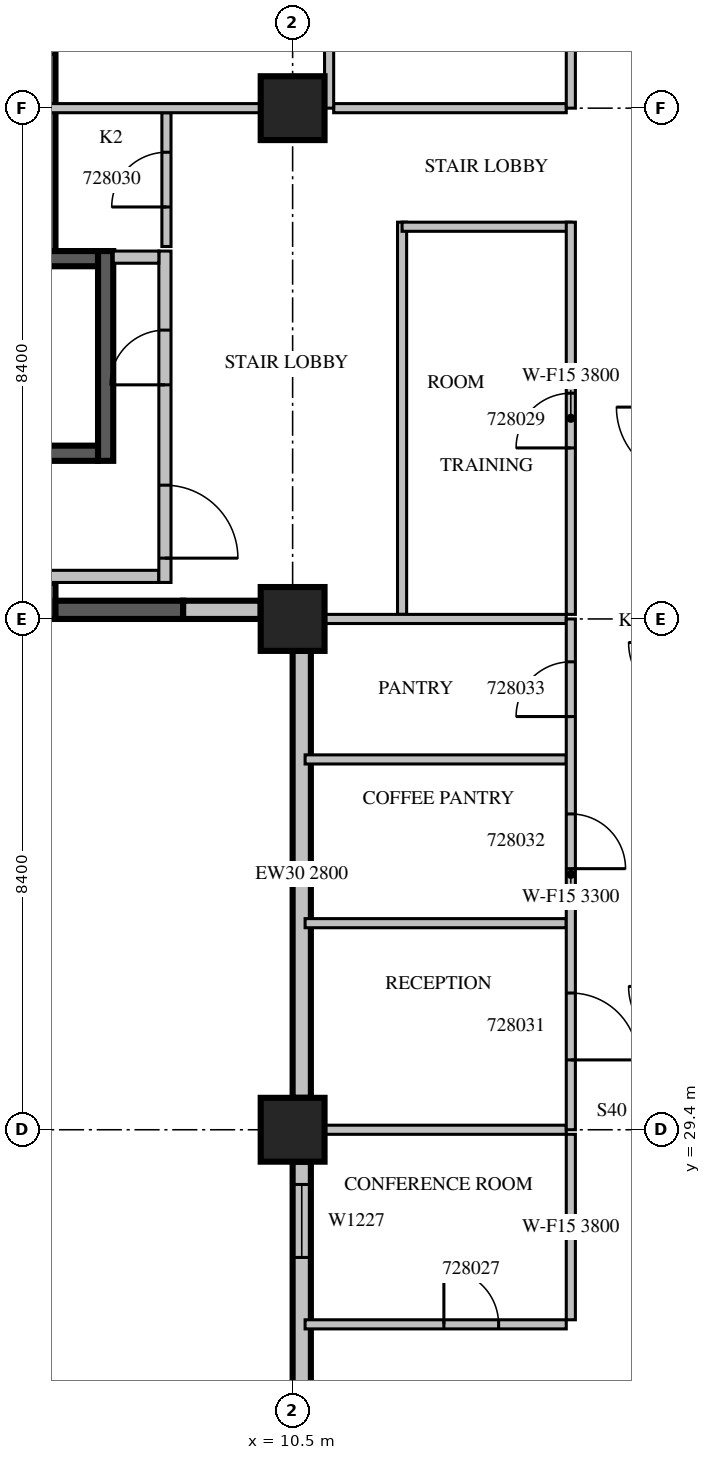
"""IFC4 building model, lengths in metres.
Left out: names, types, materials, properties, quantities, classifications, styles, units other than length and angle.
Written with IfcOpenShell. Run it as: python <this file> out.ifc"""

import sys

from ifc_helpers import new_model, si_unit, direction, frame, frame_2d, origin, origin_2d, place, context, subcontext, project, spatial, rectangle, extrude, source, transform, mapped, element, fill, save


model = new_model("IFC4")
c1 = context("Model", 3, precision=1e-05, world=origin(), true_north=direction((0.0, 1.0)))
c2 = subcontext(c1, "Body", "Model", "MODEL_VIEW")
j1 = project(units=[si_unit("LENGTHUNIT", "METRE"), si_unit("PLANEANGLEUNIT", "RADIAN")], contexts=[c1])
p1 = place(None, origin())
s1 = spatial("IfcSite", under=j1, at=p1, CompositionType="ELEMENT")
p2 = place(p1, origin())
s2 = spatial("IfcBuilding", under=s1, at=p2, CompositionType="ELEMENT")
p3 = place(p2, frame((0.0, 0.0, 128.7)))
s3 = spatial("IfcBuildingStorey", under=s2, at=p3, CompositionType="ELEMENT", Elevation=128.7)
m1 = source(origin(), c2, "Body", "SweptSolid", [
    extrude(rectangle(XDim=1.05, YDim=1.05, at=origin_2d()), origin(), (0.0, 0.0, 1.0), 4.2),
])
for number, where, z_axis, x_axis in (
    (1, (10.5, 29.4, 0.0), (0.0, 0.0, 1.0), (1.0, 0.0, 0.0)),
    (2, (10.5, 37.8, 0.0), (0.0, 0.0, 1.0), (1.0, 0.0, 0.0)),
    (3, (10.5, 46.2, 0.0), (0.0, 0.0, 1.0), (1.0, 0.0, 0.0)),
):
    element("IfcColumn", number, at=place(p3, frame(where, z_axis=z_axis, x_axis=x_axis)), inside=s3, PredefinedType="COLUMN", context=c2, shape_type="MappedRepresentation", body=[
        mapped(m1, transform((0.0, 0.0, 0.0), scale=1.0)),
    ])
m2 = source(origin(), c2, "Body", "SweptSolid", [
    extrude(rectangle(XDim=9.91, YDim=0.3, at=frame_2d((4.955, 0.0))), origin(), (0.0, 0.0, 1.0), 3.8),
])
p4 = place(p3, frame((6.45, 53.76, 0.0), z_axis=(0.0, 0.0, 1.0), x_axis=(0.0, -1.0, 0.0)))
e4 = element("IfcWall", 4, at=p4, inside=s3, PredefinedType="STANDARD", context=c2, shape_type="MappedRepresentation", body=[
    mapped(m2, transform((0.0, 0.0, 0.0), scale=1.0)),
])
m3 = source(origin(), c2, "Body", "SweptSolid", [
    extrude(rectangle(XDim=2.4, YDim=2.7, at=frame_2d((1.2, 1.35))), frame((0.0, 0.16, 0.0), z_axis=(0.0, -1.0, 0.0), x_axis=(1.0, 0.0, 0.0)), (0.0, 0.0, 1.0), 0.32),
])
p5 = place(p4, frame((4.272, 0.0, 0.6)))
e5 = element("IfcOpeningElement", 5, at=p5, cuts=e4, PredefinedType="OPENING", context=c2, shape_type="MappedRepresentation", body=[
    mapped(m3, transform((0.0, 0.0, 0.0), scale=1.0)),
])
p6 = place(p4, frame((0.936, 0.0, 0.6)))
e6 = element("IfcOpeningElement", 6, at=p6, cuts=e4, PredefinedType="OPENING", context=c2, shape_type="MappedRepresentation", body=[
    mapped(m3, transform((0.0, 0.0, 0.0), scale=1.0)),
])
m4 = source(origin(), c2, "Body", "SweptSolid", [
    extrude(rectangle(XDim=0.6, YDim=0.3, at=frame_2d((0.3, 0.0))), origin(), (0.0, 0.0, 1.0), 3.8),
])
p7 = place(p3, frame((6.45, 38.4, 0.0), z_axis=(0.0, 0.0, 1.0), x_axis=(0.0, -1.0, 0.0)))
e7 = element("IfcWall", 7, at=p7, inside=s3, PredefinedType="STANDARD", context=c2, shape_type="MappedRepresentation", body=[
    mapped(m4, transform((0.0, 0.0, 0.0), scale=1.0)),
])
m5 = source(origin(), c2, "Body", "SweptSolid", [
    extrude(rectangle(XDim=2.1, YDim=0.3, at=frame_2d((1.05, 0.0))), origin(), (0.0, 0.0, 1.0), 3.8),
])
p8 = place(p3, frame((6.6, 37.95, 0.0), z_axis=(0.0, 0.0, 1.0), x_axis=(1.0, 0.0, 0.0)))
e8 = element("IfcWall", 8, at=p8, inside=s3, PredefinedType="SOLIDWALL", context=c2, shape_type="MappedRepresentation", body=[
    mapped(m5, transform((0.0, 0.0, 0.0), scale=1.0)),
])
m6 = source(origin(), c2, "Body", "SweptSolid", [
    extrude(rectangle(XDim=1.275, YDim=0.3, at=frame_2d((0.637, 0.0))), origin(), (0.0, 0.0, 1.0), 3.8),
])
p9 = place(p3, frame((8.7, 37.95, 0.0), z_axis=(0.0, 0.0, 1.0), x_axis=(1.0, 0.0, 0.0)))
e9 = element("IfcWall", 9, at=p9, inside=s3, PredefinedType="STANDARD", context=c2, shape_type="MappedRepresentation", body=[
    mapped(m6, transform((0.0, 0.0, 0.0), scale=1.0)),
])
p10 = place(p3, frame((10.65, 37.275, 0.0), z_axis=(0.0, 0.0, 1.0), x_axis=(0.0, -1.0, 0.0)))
e10 = element("IfcWall", 10, at=p10, inside=s3, PredefinedType="STANDARD", context=c2, shape_type="SweptSolid", body=[
    extrude(rectangle(XDim=7.35, YDim=0.3, at=frame_2d((3.675, 0.0))), origin(), (0.0, 0.0, 1.0), 2.8),
])
m7 = source(origin(), c2, "Body", "SweptSolid", [
    extrude(rectangle(XDim=6.875, YDim=0.3, at=frame_2d((3.438, 0.0))), origin(), (0.0, 0.0, 1.0), 3.8),
])
p11 = place(p3, frame((10.65, 28.875, 0.0), z_axis=(0.0, 0.0, 1.0), x_axis=(0.0, -1.0, 0.0)))
e11 = element("IfcWall", 11, at=p11, inside=s3, PredefinedType="STANDARD", context=c2, shape_type="MappedRepresentation", body=[
    mapped(m7, transform((0.0, 0.0, 0.0), scale=1.0)),
])
m8 = source(origin(), c2, "Body", "SweptSolid", [
    extrude(rectangle(XDim=1.2, YDim=2.7, at=frame_2d((0.6, 1.35))), frame((0.0, 0.16, 0.0), z_axis=(0.0, -1.0, 0.0), x_axis=(1.0, 0.0, 0.0)), (0.0, 0.0, 1.0), 0.32),
])
p12 = place(p11, frame((0.375, 0.0, 0.6)))
e12 = element("IfcOpeningElement", 12, at=p12, cuts=e11, PredefinedType="OPENING", context=c2, shape_type="MappedRepresentation", body=[
    mapped(m8, transform((0.0, 0.0, 0.0), scale=1.0)),
])
m9 = source(origin(), c2, "Body", "SweptSolid", [
    extrude(rectangle(XDim=3.0, YDim=2.7, at=frame_2d((1.5, 1.35))), frame((0.0, 0.16, 0.0), z_axis=(0.0, -1.0, 0.0), x_axis=(1.0, 0.0, 0.0)), (0.0, 0.0, 1.0), 0.32),
])
p13 = place(p11, frame((3.675, 0.0, 0.6)))
e13 = element("IfcOpeningElement", 13, at=p13, cuts=e11, PredefinedType="OPENING", context=c2, shape_type="MappedRepresentation", body=[
    mapped(m9, transform((0.0, 0.0, 0.0), scale=1.0)),
])
m10 = source(origin(), c2, "Body", "SweptSolid", [
    extrude(rectangle(XDim=7.0, YDim=0.25, at=frame_2d((3.5, 0.0))), origin(), (0.0, 0.0, 1.0), 3.8),
])
p14 = place(p3, frame((0.3, 40.525, 0.0), z_axis=(0.0, 0.0, 1.0), x_axis=(1.0, 0.0, 0.0)))
e14 = element("IfcWall", 14, at=p14, inside=s3, PredefinedType="SOLIDWALL", context=c2, shape_type="MappedRepresentation", body=[
    mapped(m10, transform((0.0, 0.0, 0.0), scale=1.0)),
])
m11 = source(origin(), c2, "Body", "SweptSolid", [
    extrude(rectangle(XDim=1.1, YDim=2.1, at=frame_2d((0.55, 1.05))), frame((0.0, 0.135, 0.0), z_axis=(0.0, -1.0, 0.0), x_axis=(1.0, 0.0, 0.0)), (0.0, 0.0, 1.0), 0.27),
])
p15 = place(p14, frame((0.55, 0.0, 0.0)))
e15 = element("IfcOpeningElement", 15, at=p15, cuts=e14, PredefinedType="OPENING", context=c2, shape_type="MappedRepresentation", body=[
    mapped(m11, transform((0.0, 0.0, 0.0), scale=1.0)),
])
m12 = source(origin(), c2, "Body", "SweptSolid", [
    extrude(rectangle(XDim=1.0, YDim=0.25, at=frame_2d((0.5, 0.0))), origin(), (0.0, 0.0, 1.0), 3.8),
])
p16 = place(p3, frame((6.3, 43.725, 0.0), z_axis=(0.0, 0.0, 1.0), x_axis=(1.0, 0.0, 0.0)))
e16 = element("IfcWall", 16, at=p16, inside=s3, PredefinedType="SOLIDWALL", context=c2, shape_type="MappedRepresentation", body=[
    mapped(m12, transform((0.0, 0.0, 0.0), scale=1.0)),
])
m13 = source(origin(), c2, "Body", "SweptSolid", [
    extrude(rectangle(XDim=3.45, YDim=0.25, at=frame_2d((1.725, 0.0))), origin(), (0.0, 0.0, 1.0), 3.8),
])
p17 = place(p3, frame((7.425, 40.4, 0.0), z_axis=(0.0, 0.0, 1.0), x_axis=(0.0, 1.0, 0.0)))
e17 = element("IfcWall", 17, at=p17, inside=s3, PredefinedType="SOLIDWALL", context=c2, shape_type="MappedRepresentation", body=[
    mapped(m13, transform((0.0, 0.0, 0.0), scale=1.0)),
])
m14 = source(origin(), c2, "Body", "SweptSolid", [
    extrude(rectangle(XDim=2.0, YDim=0.2, at=frame_2d((1.0, 0.0))), origin(), (0.0, 0.0, 1.0), 3.8),
])
p18 = place(p3, frame((6.3, 38.5, 0.0), z_axis=(0.0, 0.0, 1.0), x_axis=(1.0, 0.0, 0.0)))
e18 = element("IfcWall", 18, at=p18, inside=s3, PredefinedType="PARTITIONING", context=c2, shape_type="MappedRepresentation", body=[
    mapped(m14, transform((0.0, 0.0, 0.0), scale=1.0)),
])
m15 = source(origin(), c2, "Body", "SweptSolid", [
    extrude(rectangle(XDim=5.45, YDim=0.2, at=frame_2d((2.725, 0.0))), origin(), (0.0, 0.0, 1.0), 3.8),
])
p19 = place(p3, frame((8.4, 38.4, 0.0), z_axis=(0.0, 0.0, 1.0), x_axis=(0.0, 1.0, 0.0)))
e19 = element("IfcWall", 19, at=p19, inside=s3, PredefinedType="PARTITIONING", context=c2, shape_type="MappedRepresentation", body=[
    mapped(m15, transform((0.0, 0.0, 0.0), scale=1.0)),
])
m16 = source(origin(), c2, "Body", "SweptSolid", [
    extrude(rectangle(XDim=1.2, YDim=2.1, at=frame_2d((0.6, 1.05))), frame((0.0, 0.11, 0.0), z_axis=(0.0, -1.0, 0.0), x_axis=(1.0, 0.0, 0.0)), (0.0, 0.0, 1.0), 0.22),
])
p20 = place(p19, frame((0.4, 0.0, 0.0)))
e20 = element("IfcOpeningElement", 20, at=p20, cuts=e19, PredefinedType="OPENING", context=c2, shape_type="MappedRepresentation", body=[
    mapped(m16, transform((0.0, 0.0, 0.0), scale=1.0)),
])
m17 = source(origin(), c2, "Body", "SweptSolid", [
    extrude(rectangle(XDim=0.9, YDim=2.1, at=frame_2d((0.45, 1.05))), frame((0.0, 0.11, 0.0), z_axis=(0.0, -1.0, 0.0), x_axis=(1.0, 0.0, 0.0)), (0.0, 0.0, 1.0), 0.22),
])
p21 = place(p19, frame((3.25, 0.0, 0.0)))
e21 = element("IfcOpeningElement", 21, at=p21, cuts=e19, PredefinedType="OPENING", context=c2, shape_type="MappedRepresentation", body=[
    mapped(m17, transform((0.0, 0.0, 0.0), scale=1.0)),
])
m18 = source(origin(), c2, "Body", "SweptSolid", [
    extrude(rectangle(XDim=0.75, YDim=0.2, at=frame_2d((0.375, 0.0))), origin(), (0.0, 0.0, 1.0), 3.8),
])
p22 = place(p3, frame((7.55, 43.75, 0.0), z_axis=(0.0, 0.0, 1.0), x_axis=(1.0, 0.0, 0.0)))
e22 = element("IfcWall", 22, at=p22, inside=s3, PredefinedType="PARTITIONING", context=c2, shape_type="MappedRepresentation", body=[
    mapped(m18, transform((0.0, 0.0, 0.0), scale=1.0)),
])
m19 = source(origin(), c2, "Body", "SweptSolid", [
    extrude(rectangle(XDim=4.295, YDim=0.15, at=frame_2d((2.147, 0.0))), origin(), (0.0, 0.0, 1.0), 3.8),
])
p23 = place(p3, frame((10.705, 26.2, 0.0), z_axis=(0.0, 0.0, 1.0), x_axis=(1.0, 0.0, 0.0)))
e23 = element("IfcWall", 23, at=p23, inside=s3, PredefinedType="PARTITIONING", context=c2, shape_type="MappedRepresentation", body=[
    mapped(m19, transform((0.0, 0.0, 0.0), scale=1.0)),
])
m20 = source(origin(), c2, "Body", "SweptSolid", [
    extrude(rectangle(XDim=0.9, YDim=2.1, at=frame_2d((0.45, 1.05))), frame((0.0, 0.085, 0.0), z_axis=(0.0, -1.0, 0.0), x_axis=(1.0, 0.0, 0.0)), (0.0, 0.0, 1.0), 0.17),
])
p24 = place(p23, frame((2.283, 0.0, 0.0)))
e24 = element("IfcOpeningElement", 24, at=p24, cuts=e23, PredefinedType="OPENING", context=c2, shape_type="MappedRepresentation", body=[
    mapped(m20, transform((0.0, 0.0, 0.0), scale=1.0)),
])
m21 = source(origin(), c2, "Body", "SweptSolid", [
    extrude(rectangle(XDim=3.05, YDim=0.15, at=frame_2d((1.525, 0.0))), origin(), (0.0, 0.0, 1.0), 3.8),
])
p25 = place(p3, frame((15.075, 26.275, 0.0), z_axis=(0.0, 0.0, 1.0), x_axis=(0.0, 1.0, 0.0)))
e25 = element("IfcWall", 25, at=p25, inside=s3, PredefinedType="PARTITIONING", context=c2, shape_type="MappedRepresentation", body=[
    mapped(m21, transform((0.0, 0.0, 0.0), scale=1.0)),
])
m22 = source(origin(), c2, "Body", "SweptSolid", [
    extrude(rectangle(XDim=3.976, YDim=0.15, at=frame_2d((1.988, 0.0))), origin(), (0.0, 0.0, 1.0), 3.8),
])
p26 = place(p3, frame((15.0, 29.4, 0.0), z_axis=(0.0, 0.0, 1.0), x_axis=(-1.0, 0.0, 0.0)))
e26 = element("IfcWall", 26, at=p26, inside=s3, PredefinedType="PARTITIONING", context=c2, shape_type="MappedRepresentation", body=[
    mapped(m22, transform((0.0, 0.0, 0.0), scale=1.0)),
])
m23 = source(origin(), c2, "Body", "SweptSolid", [
    extrude(rectangle(XDim=6.45, YDim=0.15, at=frame_2d((3.225, 0.0))), origin(), (0.0, 0.0, 1.0), 3.8),
])
p27 = place(p3, frame((12.3, 44.325, 0.0), z_axis=(0.0, 0.0, 1.0), x_axis=(0.0, -1.0, 0.0)))
e27 = element("IfcWall", 27, at=p27, inside=s3, PredefinedType="PARTITIONING", context=c2, shape_type="MappedRepresentation", body=[
    mapped(m23, transform((0.0, 0.0, 0.0), scale=1.0)),
])
m24 = source(origin(), c2, "Body", "SweptSolid", [
    extrude(rectangle(XDim=2.775, YDim=0.15, at=frame_2d((1.387, 0.0))), origin(), (0.0, 0.0, 1.0), 3.8),
])
p28 = place(p3, frame((15.075, 44.25, 0.0), z_axis=(0.0, 0.0, 1.0), x_axis=(-1.0, 0.0, 0.0)))
e28 = element("IfcWall", 28, at=p28, inside=s3, PredefinedType="PARTITIONING", context=c2, shape_type="MappedRepresentation", body=[
    mapped(m24, transform((0.0, 0.0, 0.0), scale=1.0)),
])
p29 = place(p3, frame((15.075, 37.875, 0.0), z_axis=(0.0, 0.0, 1.0), x_axis=(0.0, 1.0, 0.0)))
e29 = element("IfcWall", 29, at=p29, inside=s3, PredefinedType="PARTITIONING", context=c2, shape_type="MappedRepresentation", body=[
    mapped(m23, transform((0.0, 0.0, 0.0), scale=1.0)),
])
p30 = place(p29, frame((2.737, 0.0, 0.0)))
e30 = element("IfcOpeningElement", 30, at=p30, cuts=e29, PredefinedType="OPENING", context=c2, shape_type="MappedRepresentation", body=[
    mapped(m20, transform((0.0, 0.0, 0.0), scale=1.0)),
])
m25 = source(origin(), c2, "Body", "SweptSolid", [
    extrude(rectangle(XDim=2.2, YDim=0.15, at=frame_2d((1.1, 0.0))), origin(), (0.0, 0.0, 1.0), 3.8),
])
p31 = place(p3, frame((8.425, 43.925, 0.0), z_axis=(0.0, 0.0, 1.0), x_axis=(0.0, 1.0, 0.0)))
e31 = element("IfcWall", 31, at=p31, inside=s3, PredefinedType="PARTITIONING", context=c2, shape_type="MappedRepresentation", body=[
    mapped(m25, transform((0.0, 0.0, 0.0), scale=1.0)),
])
p32 = place(p31, frame((0.65, 0.0, 0.0)))
e32 = element("IfcOpeningElement", 32, at=p32, cuts=e31, PredefinedType="OPENING", context=c2, shape_type="MappedRepresentation", body=[
    mapped(m20, transform((0.0, 0.0, 0.0), scale=1.0)),
])
for number, where, z_axis, x_axis in (
    (33, (15.0, 32.797, 0.0), (0.0, 0.0, 1.0), (-1.0, 0.0, 0.0)),
    (34, (15.0, 35.49, 0.0), (0.0, 0.0, 1.0), (-1.0, 0.0, 0.0)),
):
    element("IfcWall", number, at=place(p3, frame(where, z_axis=z_axis, x_axis=x_axis)), inside=s3, PredefinedType="PARTITIONING", context=c2, shape_type="MappedRepresentation", body=[
        mapped(m19, transform((0.0, 0.0, 0.0), scale=1.0)),
    ])
p33 = place(p3, frame((15.0, 37.8, 0.0), z_axis=(0.0, 0.0, 1.0), x_axis=(-1.0, 0.0, 0.0)))
e35 = element("IfcWall", 35, at=p33, inside=s3, PredefinedType="PARTITIONING", context=c2, shape_type="MappedRepresentation", body=[
    mapped(m22, transform((0.0, 0.0, 0.0), scale=1.0)),
])
m26 = source(origin(), c2, "Body", "SweptSolid", [
    extrude(rectangle(XDim=3.471, YDim=0.15, at=frame_2d((1.736, 0.0))), origin(), (0.0, 0.0, 1.0), 3.8),
])
p34 = place(p3, frame((9.976, 46.2, 0.0), z_axis=(0.0, 0.0, 1.0), x_axis=(-1.0, 0.0, 0.0)))
e36 = element("IfcWall", 36, at=p34, inside=s3, PredefinedType="PARTITIONING", context=c2, shape_type="MappedRepresentation", body=[
    mapped(m26, transform((0.0, 0.0, 0.0), scale=1.0)),
])
m27 = source(origin(), c2, "Body", "SweptSolid", [
    extrude(rectangle(XDim=3.825, YDim=0.15, at=frame_2d((1.913, 0.0))), origin(), (0.0, 0.0, 1.0), 3.8),
])
p35 = place(p3, frame((15.0, 46.2, 0.0), z_axis=(0.0, 0.0, 1.0), x_axis=(-1.0, 0.0, 0.0)))
e37 = element("IfcWall", 37, at=p35, inside=s3, PredefinedType="PARTITIONING", context=c2, shape_type="MappedRepresentation", body=[
    mapped(m27, transform((0.0, 0.0, 0.0), scale=1.0)),
])
m28 = source(origin(), c2, "Body", "SweptSolid", [
    extrude(rectangle(XDim=7.26, YDim=0.15, at=frame_2d((3.63, 0.0))), origin(), (0.0, 0.0, 1.0), 3.8),
])
p36 = place(p3, frame((11.1, 46.2, 0.0), z_axis=(0.0, 0.0, 1.0), x_axis=(0.0, 1.0, 0.0)))
e38 = element("IfcWall", 38, at=p36, inside=s3, PredefinedType="PARTITIONING", context=c2, shape_type="MappedRepresentation", body=[
    mapped(m28, transform((0.0, 0.0, 0.0), scale=1.0)),
])
p37 = place(p36, frame((1.715, 0.0, 0.0)))
e39 = element("IfcOpeningElement", 39, at=p37, cuts=e38, PredefinedType="OPENING", context=c2, shape_type="MappedRepresentation", body=[
    mapped(m20, transform((0.0, 0.0, 0.0), scale=1.0)),
])
p38 = place(p36, frame((4.155, 0.0, 0.0)))
e40 = element("IfcOpeningElement", 40, at=p38, cuts=e38, PredefinedType="OPENING", context=c2, shape_type="MappedRepresentation", body=[
    mapped(m20, transform((0.0, 0.0, 0.0), scale=1.0)),
])
m29 = source(origin(), c2, "Body", "SweptSolid", [
    extrude(rectangle(XDim=8.4, YDim=0.15, at=frame_2d((4.2, 0.0))), origin(), (0.0, 0.0, 1.0), 3.3),
])
p39 = place(p3, frame((15.075, 29.4, 0.0), z_axis=(0.0, 0.0, 1.0), x_axis=(0.0, 1.0, 0.0)))
e41 = element("IfcWall", 41, at=p39, inside=s3, PredefinedType="PARTITIONING", context=c2, shape_type="MappedRepresentation", body=[
    mapped(m29, transform((0.0, 0.0, 0.0), scale=1.0)),
])
m30 = source(origin(), c2, "Body", "SweptSolid", [
    extrude(rectangle(XDim=1.1, YDim=2.1, at=frame_2d((0.55, 1.05))), frame((0.0, 0.085, 0.0), z_axis=(0.0, -1.0, 0.0), x_axis=(1.0, 0.0, 0.0)), (0.0, 0.0, 1.0), 0.17),
])
p40 = place(p39, frame((1.149, 0.0, 0.0)))
e42 = element("IfcOpeningElement", 42, at=p40, cuts=e41, PredefinedType="OPENING", context=c2, shape_type="MappedRepresentation", body=[
    mapped(m30, transform((0.0, 0.0, 0.0), scale=1.0)),
])
p41 = place(p39, frame((4.293, 0.0, 0.0)))
e43 = element("IfcOpeningElement", 43, at=p41, cuts=e41, PredefinedType="OPENING", context=c2, shape_type="MappedRepresentation", body=[
    mapped(m20, transform((0.0, 0.0, 0.0), scale=1.0)),
])
p42 = place(p39, frame((6.795, 0.0, 0.0)))
e44 = element("IfcOpeningElement", 44, at=p42, cuts=e41, PredefinedType="OPENING", context=c2, shape_type="MappedRepresentation", body=[
    mapped(m20, transform((0.0, 0.0, 0.0), scale=1.0)),
])
p43 = place(p3, frame((15.075, 46.2, 0.0), z_axis=(0.0, 0.0, 1.0), x_axis=(0.0, 1.0, 0.0)))
e45 = element("IfcWall", 45, at=p43, inside=s3, PredefinedType="PARTITIONING", context=c2, shape_type="MappedRepresentation", body=[
    mapped(m28, transform((0.0, 0.0, 0.0), scale=1.0)),
])
m31 = source(origin(), c2, "Body", "SweptSolid", [
    extrude(rectangle(XDim=1.2, YDim=2.1, at=frame_2d((0.6, 1.05))), frame((0.0, 0.085, 0.0), z_axis=(0.0, -1.0, 0.0), x_axis=(1.0, 0.0, 0.0)), (0.0, 0.0, 1.0), 0.17),
])
p44 = place(p43, frame((3.067, 0.0, 0.0)))
e46 = element("IfcOpeningElement", 46, at=p44, cuts=e45, PredefinedType="OPENING", context=c2, shape_type="MappedRepresentation", body=[
    mapped(m31, transform((0.0, 0.0, 0.0), scale=1.0)),
])
m32 = source(origin(), c2, "Body", "SweptSolid", [
    extrude(rectangle(XDim=1.2, YDim=2.7, at=frame_2d((0.6, 1.35))), frame((0.0, 0.03, 0.0), z_axis=(0.0, -1.0, 0.0), x_axis=(1.0, 0.0, 0.0)), (0.0, 0.0, 1.0), 0.06),
])
p45 = place(p12, origin())
e47 = element("IfcWindow", 47, at=p45, inside=s3, PartitioningType="SINGLE_PANEL", PredefinedType="WINDOW", context=c2, shape_type="MappedRepresentation", body=[
    mapped(m32, transform((0.0, 0.0, 0.0), scale=1.0)),
])
fill(e12, e47)
m33 = source(origin(), c2, "Body", "SweptSolid", [
    extrude(rectangle(XDim=1.2, YDim=2.1, at=frame_2d((0.6, 1.05))), frame((0.0, 0.025, 0.0), z_axis=(0.0, -1.0, 0.0), x_axis=(1.0, 0.0, 0.0)), (0.0, 0.0, 1.0), 0.05),
])
p46 = place(p20, origin())
e48 = element("IfcDoor", 48, at=p46, inside=s3, OperationType="SINGLE_SWING_RIGHT", PredefinedType="DOOR", context=c2, shape_type="MappedRepresentation", body=[
    mapped(m33, transform((0.0, 0.0, 0.0), scale=1.0)),
])
fill(e20, e48)
m34 = source(origin(), c2, "Body", "SweptSolid", [
    extrude(rectangle(XDim=0.9, YDim=2.1, at=frame_2d((0.45, 1.05))), frame((0.0, 0.025, 0.0), z_axis=(0.0, -1.0, 0.0), x_axis=(1.0, 0.0, 0.0)), (0.0, 0.0, 1.0), 0.05),
])
p47 = place(p21, origin())
e49 = element("IfcDoor", 49, at=p47, inside=s3, OperationType="SINGLE_SWING_LEFT", PredefinedType="DOOR", context=c2, shape_type="MappedRepresentation", body=[
    mapped(m34, transform((0.0, 0.0, 0.0), scale=1.0)),
])
fill(e21, e49)
p48 = place(p24, origin())
e50 = element("IfcDoor", 50, at=p48, inside=s3, OperationType="SINGLE_SWING_LEFT", PredefinedType="DOOR", context=c2, shape_type="MappedRepresentation", body=[
    mapped(m34, transform((0.0, 0.0, 0.0), scale=1.0)),
])
fill(e24, e50)
p49 = place(p30, origin())
e51 = element("IfcDoor", 51, at=p49, inside=s3, OperationType="SINGLE_SWING_LEFT", PredefinedType="DOOR", context=c2, shape_type="MappedRepresentation", body=[
    mapped(m34, transform((0.0, 0.0, 0.0), scale=1.0)),
])
fill(e30, e51)
p50 = place(p32, origin())
e52 = element("IfcDoor", 52, at=p50, inside=s3, OperationType="SINGLE_SWING_LEFT", PredefinedType="DOOR", context=c2, shape_type="MappedRepresentation", body=[
    mapped(m34, transform((0.0, 0.0, 0.0), scale=1.0)),
])
fill(e32, e52)
m35 = source(origin(), c2, "Body", "SweptSolid", [
    extrude(rectangle(XDim=1.1, YDim=2.1, at=frame_2d((0.55, 1.05))), frame((0.0, 0.025, 0.0), z_axis=(0.0, -1.0, 0.0), x_axis=(1.0, 0.0, 0.0)), (0.0, 0.0, 1.0), 0.05),
])
p51 = place(p40, origin())
e53 = element("IfcDoor", 53, at=p51, inside=s3, OperationType="SINGLE_SWING_RIGHT", PredefinedType="DOOR", context=c2, shape_type="MappedRepresentation", body=[
    mapped(m35, transform((0.0, 0.0, 0.0), scale=1.0)),
])
fill(e42, e53)
p52 = place(p41, origin())
e54 = element("IfcDoor", 54, at=p52, inside=s3, OperationType="SINGLE_SWING_RIGHT", PredefinedType="DOOR", context=c2, shape_type="MappedRepresentation", body=[
    mapped(m34, transform((0.0, 0.0, 0.0), scale=1.0)),
])
fill(e43, e54)
p53 = place(p42, origin())
e55 = element("IfcDoor", 55, at=p53, inside=s3, OperationType="SINGLE_SWING_LEFT", PredefinedType="DOOR", context=c2, shape_type="MappedRepresentation", body=[
    mapped(m34, transform((0.0, 0.0, 0.0), scale=1.0)),
])
fill(e44, e55)
save(model, sys.argv[1])
